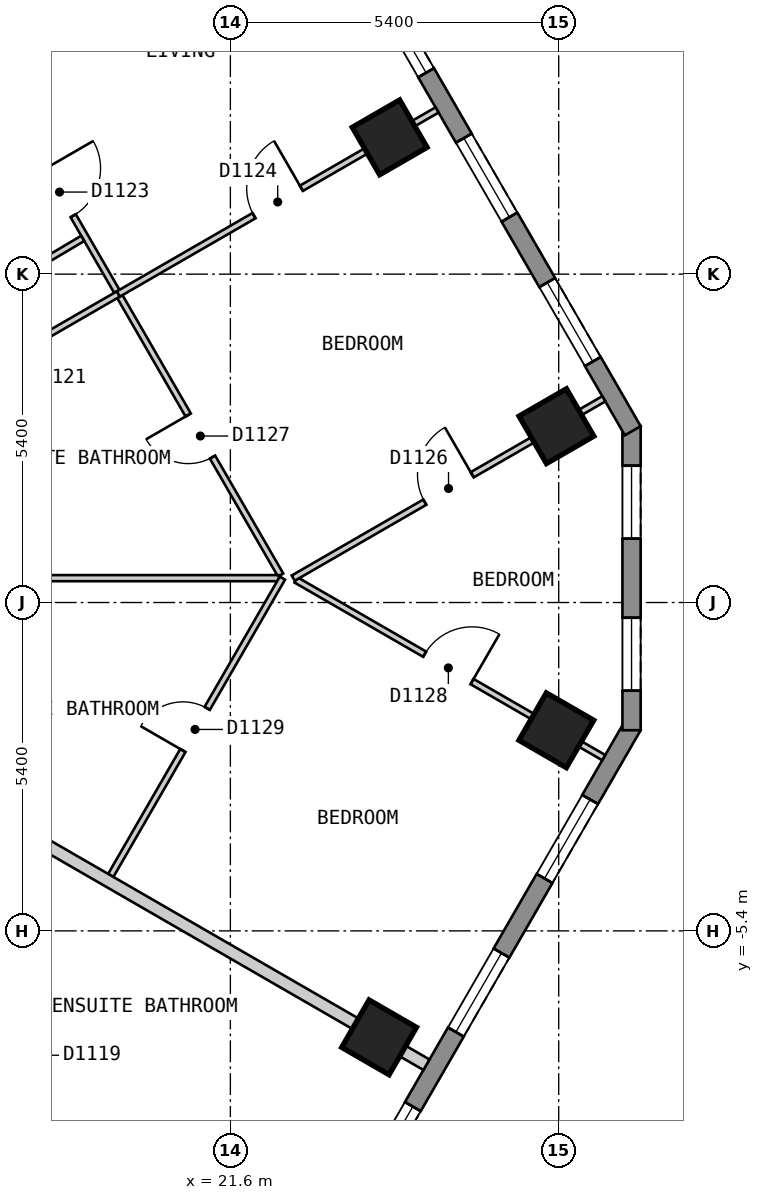
"""IFC4 building model, lengths in metres.
Left out: names, types, materials, properties, quantities, classifications, styles, units other than length and angle.
Written with IfcOpenShell. Run it as: python <this file> out.ifc"""

import sys

from ifc_helpers import new_model, si_unit, direction, frame, frame_2d, origin, origin_2d, place, context, subcontext, project, spatial, polyline, rectangle, outline, extrude, element, fill, save


model = new_model("IFC4")
c1 = context("Model", 3, precision=1e-05, world=origin(), true_north=direction((0.0, 1.0)))
c2 = subcontext(c1, "Body", "Model", "MODEL_VIEW")
j1 = project(units=[si_unit("LENGTHUNIT", "METRE"), si_unit("PLANEANGLEUNIT", "RADIAN")], contexts=[c1])
p1 = place(None, origin())
s1 = spatial("IfcSite", under=j1, at=p1, CompositionType="ELEMENT")
p2 = place(p1, origin())
s2 = spatial("IfcBuilding", under=s1, at=p2, CompositionType="ELEMENT")
p3 = place(p2, frame((0.0, 0.0, 138.6)))
s3 = spatial("IfcBuildingStorey", under=s2, at=p3, CompositionType="ELEMENT", Elevation=138.6)
for number, where, z_axis, x_axis in (
    (1, (24.046, -7.151, 0.0), (0.0, 0.0, 1.0), (0.5, 0.866, 0.0)),
    (2, (26.961, -2.101, 0.0), (0.0, 0.0, 1.0), (0.5, 0.866, 0.0)),
    (3, (26.963, 2.9, 0.0), (0.0, 0.0, 1.0), (-0.5, 0.866, 0.0)),
    (4, (24.22, 7.65, 0.0), (0.0, 0.0, 1.0), (-0.5, 0.866, 0.0)),
):
    element("IfcColumn", number, at=place(p3, frame(where, z_axis=z_axis, x_axis=x_axis)), inside=s3, PredefinedType="COLUMN", context=c2, shape_type="SweptSolid", body=[
        extrude(rectangle(XDim=0.9, YDim=0.9, at=origin_2d()), origin(), (0.0, 0.0, 1.0), 3.0),
    ])
p4 = place(p3, frame((15.862, -23.425, 0.0), z_axis=(0.0, 0.0, 1.0), x_axis=(0.500017503135, 0.866015298109, 0.0)))
e5 = element("IfcWall", 5, at=p4, inside=s3, PredefinedType="SOLIDWALL", context=c2, shape_type="SweptSolid", body=[
    extrude(outline(polyline([(0.0, -0.15), (24.711, -0.15), (24.631, 0.15), (0.08, 0.15), (0.0, -0.15)])), origin(), (0.0, 0.0, 1.0), 2.7),
])
p5 = place(p4, frame((1.4, 0.0, 0.15)))
e6 = element("IfcOpeningElement", 6, at=p5, cuts=e5, PredefinedType="OPENING", context=c2, shape_type="SweptSolid", body=[
    extrude(rectangle(XDim=1.5, YDim=2.1, at=frame_2d((0.75, 1.05))), frame((0.0, 0.16, 0.0), z_axis=(0.0, -1.0, 0.0), x_axis=(1.0, 0.0, 0.0)), (0.0, 0.0, 1.0), 0.32),
])
p6 = place(p4, frame((4.316, 0.0, 0.15)))
e7 = element("IfcOpeningElement", 7, at=p6, cuts=e5, PredefinedType="OPENING", context=c2, shape_type="SweptSolid", body=[
    extrude(rectangle(XDim=1.5, YDim=2.1, at=frame_2d((0.75, 1.05))), frame((0.0, 0.16, 0.0), z_axis=(0.0, -1.0, 0.0), x_axis=(1.0, 0.0, 0.0)), (0.0, 0.0, 1.0), 0.32),
])
p7 = place(p4, frame((7.231, 0.0, 0.15)))
e8 = element("IfcOpeningElement", 8, at=p7, cuts=e5, PredefinedType="OPENING", context=c2, shape_type="SweptSolid", body=[
    extrude(rectangle(XDim=1.5, YDim=2.1, at=frame_2d((0.75, 1.05))), frame((0.0, 0.16, 0.0), z_axis=(0.0, -1.0, 0.0), x_axis=(1.0, 0.0, 0.0)), (0.0, 0.0, 1.0), 0.32),
])
p8 = place(p4, frame((10.147, 0.0, 0.15)))
e9 = element("IfcOpeningElement", 9, at=p8, cuts=e5, PredefinedType="OPENING", context=c2, shape_type="SweptSolid", body=[
    extrude(rectangle(XDim=1.5, YDim=2.1, at=frame_2d((0.75, 1.05))), frame((0.0, 0.16, 0.0), z_axis=(0.0, -1.0, 0.0), x_axis=(1.0, 0.0, 0.0)), (0.0, 0.0, 1.0), 0.32),
])
p9 = place(p4, frame((13.062, 0.0, 0.15)))
e10 = element("IfcOpeningElement", 10, at=p9, cuts=e5, PredefinedType="OPENING", context=c2, shape_type="SweptSolid", body=[
    extrude(rectangle(XDim=1.5, YDim=2.1, at=frame_2d((0.75, 1.05))), frame((0.0, 0.16, 0.0), z_axis=(0.0, -1.0, 0.0), x_axis=(1.0, 0.0, 0.0)), (0.0, 0.0, 1.0), 0.32),
])
p10 = place(p4, frame((15.977, 0.0, 0.15)))
e11 = element("IfcOpeningElement", 11, at=p10, cuts=e5, PredefinedType="OPENING", context=c2, shape_type="SweptSolid", body=[
    extrude(rectangle(XDim=1.5, YDim=2.1, at=frame_2d((0.75, 1.05))), frame((0.0, 0.16, 0.0), z_axis=(0.0, -1.0, 0.0), x_axis=(1.0, 0.0, 0.0)), (0.0, 0.0, 1.0), 0.32),
])
p11 = place(p4, frame((18.893, 0.0, 0.15)))
e12 = element("IfcOpeningElement", 12, at=p11, cuts=e5, PredefinedType="OPENING", context=c2, shape_type="SweptSolid", body=[
    extrude(rectangle(XDim=1.5, YDim=2.1, at=frame_2d((0.75, 1.05))), frame((0.0, 0.16, 0.0), z_axis=(0.0, -1.0, 0.0), x_axis=(1.0, 0.0, 0.0)), (0.0, 0.0, 1.0), 0.32),
])
p12 = place(p4, frame((21.809, 0.0, 0.15)))
e13 = element("IfcOpeningElement", 13, at=p12, cuts=e5, PredefinedType="OPENING", context=c2, shape_type="SweptSolid", body=[
    extrude(rectangle(XDim=1.5, YDim=2.1, at=frame_2d((0.75, 1.05))), frame((0.0, 0.16, 0.0), z_axis=(0.0, -1.0, 0.0), x_axis=(1.0, 0.0, 0.0)), (0.0, 0.0, 1.0), 0.32),
])
p13 = place(p3, frame((28.198, -2.1, 0.0), z_axis=(0.0, 0.0, 1.0), x_axis=(0.0, 1.0, 0.0)))
e14 = element("IfcWall", 14, at=p13, inside=s3, PredefinedType="SOLIDWALL", context=c2, shape_type="SweptSolid", body=[
    extrude(outline(polyline([(0.0, -0.15), (5.0, -0.15), (4.92, 0.15), (0.08, 0.15), (0.0, -0.15)])), origin(), (0.0, 0.0, 1.0), 2.7),
])
p14 = place(p13, frame((0.65, 0.0, 0.15)))
e15 = element("IfcOpeningElement", 15, at=p14, cuts=e14, PredefinedType="OPENING", context=c2, shape_type="SweptSolid", body=[
    extrude(rectangle(XDim=1.2, YDim=2.1, at=frame_2d((0.6, 1.05))), frame((0.0, 0.16, 0.0), z_axis=(0.0, -1.0, 0.0), x_axis=(1.0, 0.0, 0.0)), (0.0, 0.0, 1.0), 0.32),
])
p15 = place(p13, frame((3.15, 0.0, 0.15)))
e16 = element("IfcOpeningElement", 16, at=p15, cuts=e14, PredefinedType="OPENING", context=c2, shape_type="SweptSolid", body=[
    extrude(rectangle(XDim=1.2, YDim=2.1, at=frame_2d((0.6, 1.05))), frame((0.0, 0.16, 0.0), z_axis=(0.0, -1.0, 0.0), x_axis=(1.0, 0.0, 0.0)), (0.0, 0.0, 1.0), 0.32),
])
p16 = place(p3, frame((28.218, 2.825, 0.0), z_axis=(0.0, 0.0, 1.0), x_axis=(-0.500020536353, 0.866013546791, 0.0)))
e17 = element("IfcWall", 17, at=p16, inside=s3, PredefinedType="SOLIDWALL", context=c2, shape_type="SweptSolid", body=[
    extrude(outline(polyline([(0.0, -0.15), (23.325, -0.15), (23.245, 0.15), (0.08, 0.15), (0.0, -0.15)])), origin(), (0.0, 0.0, 1.0), 2.7),
])
p17 = place(p16, frame((1.314, 0.0, 0.15)))
e18 = element("IfcOpeningElement", 18, at=p17, cuts=e17, PredefinedType="OPENING", context=c2, shape_type="SweptSolid", body=[
    extrude(rectangle(XDim=1.5, YDim=2.1, at=frame_2d((0.75, 1.05))), frame((0.0, 0.16, 0.0), z_axis=(0.0, -1.0, 0.0), x_axis=(1.0, 0.0, 0.0)), (0.0, 0.0, 1.0), 0.32),
])
p18 = place(p16, frame((4.056, 0.0, 0.15)))
e19 = element("IfcOpeningElement", 19, at=p18, cuts=e17, PredefinedType="OPENING", context=c2, shape_type="SweptSolid", body=[
    extrude(rectangle(XDim=1.5, YDim=2.1, at=frame_2d((0.75, 1.05))), frame((0.0, 0.16, 0.0), z_axis=(0.0, -1.0, 0.0), x_axis=(1.0, 0.0, 0.0)), (0.0, 0.0, 1.0), 0.32),
])
p19 = place(p16, frame((6.798, 0.0, 0.15)))
e20 = element("IfcOpeningElement", 20, at=p19, cuts=e17, PredefinedType="OPENING", context=c2, shape_type="SweptSolid", body=[
    extrude(rectangle(XDim=1.5, YDim=2.1, at=frame_2d((0.75, 1.05))), frame((0.0, 0.16, 0.0), z_axis=(0.0, -1.0, 0.0), x_axis=(1.0, 0.0, 0.0)), (0.0, 0.0, 1.0), 0.32),
])
p20 = place(p16, frame((9.541, 0.0, 0.15)))
e21 = element("IfcOpeningElement", 21, at=p20, cuts=e17, PredefinedType="OPENING", context=c2, shape_type="SweptSolid", body=[
    extrude(rectangle(XDim=1.5, YDim=2.1, at=frame_2d((0.75, 1.05))), frame((0.0, 0.16, 0.0), z_axis=(0.0, -1.0, 0.0), x_axis=(1.0, 0.0, 0.0)), (0.0, 0.0, 1.0), 0.32),
])
p21 = place(p16, frame((12.284, 0.0, 0.15)))
e22 = element("IfcOpeningElement", 22, at=p21, cuts=e17, PredefinedType="OPENING", context=c2, shape_type="SweptSolid", body=[
    extrude(rectangle(XDim=1.5, YDim=2.1, at=frame_2d((0.75, 1.05))), frame((0.0, 0.16, 0.0), z_axis=(0.0, -1.0, 0.0), x_axis=(1.0, 0.0, 0.0)), (0.0, 0.0, 1.0), 0.32),
])
p22 = place(p16, frame((15.027, 0.0, 0.15)))
e23 = element("IfcOpeningElement", 23, at=p22, cuts=e17, PredefinedType="OPENING", context=c2, shape_type="SweptSolid", body=[
    extrude(rectangle(XDim=1.5, YDim=2.1, at=frame_2d((0.75, 1.05))), frame((0.0, 0.16, 0.0), z_axis=(0.0, -1.0, 0.0), x_axis=(1.0, 0.0, 0.0)), (0.0, 0.0, 1.0), 0.32),
])
p23 = place(p16, frame((17.769, 0.0, 0.15)))
e24 = element("IfcOpeningElement", 24, at=p23, cuts=e17, PredefinedType="OPENING", context=c2, shape_type="SweptSolid", body=[
    extrude(rectangle(XDim=1.5, YDim=2.1, at=frame_2d((0.75, 1.05))), frame((0.0, 0.16, 0.0), z_axis=(0.0, -1.0, 0.0), x_axis=(1.0, 0.0, 0.0)), (0.0, 0.0, 1.0), 0.32),
])
p24 = place(p16, frame((20.511, 0.0, 0.15)))
e25 = element("IfcOpeningElement", 25, at=p24, cuts=e17, PredefinedType="OPENING", context=c2, shape_type="SweptSolid", body=[
    extrude(rectangle(XDim=1.5, YDim=2.1, at=frame_2d((0.75, 1.05))), frame((0.0, 0.16, 0.0), z_axis=(0.0, -1.0, 0.0), x_axis=(1.0, 0.0, 0.0)), (0.0, 0.0, 1.0), 0.32),
])
p25 = place(p3, frame((14.323, 14.487, 0.0), z_axis=(0.0, 0.0, 1.0), x_axis=(0.500011052545, -0.866019022501, 0.0)))
e26 = element("IfcWall", 26, at=p25, inside=s3, PredefinedType="PARTITIONING", context=c2, shape_type="SweptSolid", body=[
    extrude(rectangle(XDim=16.208, YDim=0.1, at=frame_2d((8.104, 0.0))), origin(), (0.0, 0.0, 1.0), 2.7),
])
p26 = place(p25, frame((8.484, 0.0, 0.0)))
e27 = element("IfcOpeningElement", 27, at=p26, cuts=e26, PredefinedType="OPENING", context=c2, shape_type="SweptSolid", body=[
    extrude(rectangle(XDim=0.9, YDim=2.1, at=frame_2d((0.45, 1.05))), frame((0.0, 0.06, 0.0), z_axis=(0.0, -1.0, 0.0), x_axis=(1.0, 0.0, 0.0)), (0.0, 0.0, 1.0), 0.12),
])
p27 = place(p25, frame((2.252, 0.0, 0.0)))
e28 = element("IfcOpeningElement", 28, at=p27, cuts=e26, PredefinedType="OPENING", context=c2, shape_type="SweptSolid", body=[
    extrude(rectangle(XDim=0.8, YDim=2.1, at=frame_2d((0.4, 1.05))), frame((0.0, 0.06, 0.0), z_axis=(0.0, -1.0, 0.0), x_axis=(1.0, 0.0, 0.0)), (0.0, 0.0, 1.0), 0.12),
])
p28 = place(p25, frame((13.167, 0.0, 0.0)))
e29 = element("IfcOpeningElement", 29, at=p28, cuts=e26, PredefinedType="OPENING", context=c2, shape_type="SweptSolid", body=[
    extrude(rectangle(XDim=0.8, YDim=2.1, at=frame_2d((0.4, 1.05))), frame((0.0, 0.06, 0.0), z_axis=(0.0, -1.0, 0.0), x_axis=(1.0, 0.0, 0.0)), (0.0, 0.0, 1.0), 0.12),
])
p29 = place(p3, frame((22.679, 0.372, 0.0), z_axis=(0.0, 0.0, 1.0), x_axis=(0.865985260119, -0.500069524424, 0.0)))
e30 = element("IfcWall", 30, at=p29, inside=s3, PredefinedType="PARTITIONING", context=c2, shape_type="SweptSolid", body=[
    extrude(rectangle(XDim=5.845, YDim=0.1, at=frame_2d((2.923, 0.0))), origin(), (0.0, 0.0, 1.0), 2.7),
])
p30 = place(p29, frame((2.444, 0.0, 0.0)))
e31 = element("IfcOpeningElement", 31, at=p30, cuts=e30, PredefinedType="OPENING", context=c2, shape_type="SweptSolid", body=[
    extrude(rectangle(XDim=0.9, YDim=2.1, at=frame_2d((0.45, 1.05))), frame((0.0, 0.06, 0.0), z_axis=(0.0, -1.0, 0.0), x_axis=(1.0, 0.0, 0.0)), (0.0, 0.0, 1.0), 0.12),
])
p31 = place(p3, frame((17.782, 0.401, 0.0), z_axis=(0.0, 0.0, 1.0), x_axis=(1.0, 0.0, 0.0)))
e32 = element("IfcWall", 32, at=p31, inside=s3, PredefinedType="PARTITIONING", context=c2, shape_type="SweptSolid", body=[
    extrude(rectangle(XDim=4.616, YDim=0.1, at=frame_2d((2.308, 0.0))), origin(), (0.0, 0.0, 1.0), 2.7),
])
p32 = place(p3, frame((19.633, -4.488, 0.0), z_axis=(0.0, 0.0, 1.0), x_axis=(0.500050624552, 0.865996173713, 0.0)))
e33 = element("IfcWall", 33, at=p32, inside=s3, PredefinedType="PARTITIONING", context=c2, shape_type="SweptSolid", body=[
    extrude(rectangle(XDim=5.646, YDim=0.1, at=frame_2d((2.823, 0.0))), origin(), (0.0, 0.0, 1.0), 2.7),
])
p33 = place(p32, frame((2.372, 0.0, 0.0)))
e34 = element("IfcOpeningElement", 34, at=p33, cuts=e33, PredefinedType="OPENING", context=c2, shape_type="SweptSolid", body=[
    extrude(rectangle(XDim=0.8, YDim=2.1, at=frame_2d((0.4, 1.05))), frame((0.0, 0.06, 0.0), z_axis=(0.0, -1.0, 0.0), x_axis=(1.0, 0.0, 0.0)), (0.0, 0.0, 1.0), 0.12),
])
p34 = place(p3, frame((16.339, 3.1, 0.0), z_axis=(0.0, 0.0, 1.0), x_axis=(0.866031112038, 0.499990112884, 0.0)))
e35 = element("IfcWall", 35, at=p34, inside=s3, PredefinedType="PARTITIONING", context=c2, shape_type="SweptSolid", body=[
    extrude(rectangle(XDim=3.948, YDim=0.1, at=frame_2d((1.974, 0.0))), origin(), (0.0, 0.0, 1.0), 2.7),
])
p35 = place(p3, frame((22.634, 0.401, 0.0), z_axis=(0.0, 0.0, 1.0), x_axis=(0.86601325737, 0.500021037617, 0.0)))
e36 = element("IfcWall", 36, at=p35, inside=s3, PredefinedType="PARTITIONING", context=c2, shape_type="SweptSolid", body=[
    extrude(rectangle(XDim=5.898, YDim=0.1, at=frame_2d((2.949, 0.0))), origin(), (0.0, 0.0, 1.0), 2.7),
])
p36 = place(p35, frame((2.499, 0.0, 0.0)))
e37 = element("IfcOpeningElement", 37, at=p36, cuts=e36, PredefinedType="OPENING", context=c2, shape_type="SweptSolid", body=[
    extrude(rectangle(XDim=0.9, YDim=2.1, at=frame_2d((0.45, 1.05))), frame((0.0, 0.06, 0.0), z_axis=(0.0, -1.0, 0.0), x_axis=(1.0, 0.0, 0.0)), (0.0, 0.0, 1.0), 0.12),
])
p37 = place(p3, frame((15.818, 4.002, 0.0), z_axis=(0.0, 0.0, 1.0), x_axis=(0.860457323494, 0.509522516132, 0.0)))
e38 = element("IfcWall", 38, at=p37, inside=s3, PredefinedType="PARTITIONING", context=c2, shape_type="SweptSolid", body=[
    extrude(rectangle(XDim=3.898, YDim=0.1, at=frame_2d((1.949, 0.0))), origin(), (0.0, 0.0, 1.0), 2.7),
])
p38 = place(p37, frame((1.524, 0.0, 0.0)))
e39 = element("IfcOpeningElement", 39, at=p38, cuts=e38, PredefinedType="OPENING", context=c2, shape_type="SweptSolid", body=[
    extrude(rectangle(XDim=0.8, YDim=2.1, at=frame_2d((0.4, 1.05))), frame((0.0, 0.06, 0.0), z_axis=(0.0, -1.0, 0.0), x_axis=(1.0, 0.0, 0.0)), (0.0, 0.0, 1.0), 0.12),
])
p39 = place(p3, frame((16.165, -2.601, 0.0), z_axis=(0.0, 0.0, 1.0), x_axis=(0.866016855193, -0.500014806302, 0.0)))
e40 = element("IfcWall", 40, at=p39, inside=s3, PredefinedType="PARTITIONING", context=c2, shape_type="SweptSolid", body=[
    extrude(rectangle(XDim=10.0, YDim=0.2, at=frame_2d((5.0, 0.0))), origin(), (0.0, 0.0, 1.0), 2.7),
])
p40 = place(p3, frame((19.758, 5.074, 0.0), z_axis=(0.0, 0.0, 1.0), x_axis=(0.866007554612, 0.500030914399, 0.0)))
e41 = element("IfcWall", 41, at=p40, inside=s3, PredefinedType="PARTITIONING", context=c2, shape_type="SweptSolid", body=[
    extrude(rectangle(XDim=6.052, YDim=0.1, at=frame_2d((3.026, 0.0))), origin(), (0.0, 0.0, 1.0), 2.7),
])
p41 = place(p40, frame((2.576, 0.0, 0.0)))
e42 = element("IfcOpeningElement", 42, at=p41, cuts=e41, PredefinedType="OPENING", context=c2, shape_type="SweptSolid", body=[
    extrude(rectangle(XDim=0.9, YDim=2.1, at=frame_2d((0.45, 1.05))), frame((0.0, 0.06, 0.0), z_axis=(0.0, -1.0, 0.0), x_axis=(1.0, 0.0, 0.0)), (0.0, 0.0, 1.0), 0.12),
])
p42 = place(p10, origin())
e43 = element("IfcWindow", 43, at=p42, inside=s3, PartitioningType="SINGLE_PANEL", PredefinedType="WINDOW", context=c2, shape_type="SweptSolid", body=[
    extrude(rectangle(XDim=1.5, YDim=2.1, at=frame_2d((0.75, 1.05))), frame((0.0, 0.03, 0.0), z_axis=(0.0, -1.0, 0.0), x_axis=(1.0, 0.0, 0.0)), (0.0, 0.0, 1.0), 0.06),
])
fill(e11, e43)
p43 = place(p11, origin())
e44 = element("IfcWindow", 44, at=p43, inside=s3, PartitioningType="SINGLE_PANEL", PredefinedType="WINDOW", context=c2, shape_type="SweptSolid", body=[
    extrude(rectangle(XDim=1.5, YDim=2.1, at=frame_2d((0.75, 1.05))), frame((0.0, 0.03, 0.0), z_axis=(0.0, -1.0, 0.0), x_axis=(1.0, 0.0, 0.0)), (0.0, 0.0, 1.0), 0.06),
])
fill(e12, e44)
p44 = place(p12, origin())
e45 = element("IfcWindow", 45, at=p44, inside=s3, PartitioningType="SINGLE_PANEL", PredefinedType="WINDOW", context=c2, shape_type="SweptSolid", body=[
    extrude(rectangle(XDim=1.5, YDim=2.1, at=frame_2d((0.75, 1.05))), frame((0.0, 0.03, 0.0), z_axis=(0.0, -1.0, 0.0), x_axis=(1.0, 0.0, 0.0)), (0.0, 0.0, 1.0), 0.06),
])
fill(e13, e45)
p45 = place(p14, origin())
e46 = element("IfcWindow", 46, at=p45, inside=s3, PartitioningType="SINGLE_PANEL", PredefinedType="WINDOW", context=c2, shape_type="SweptSolid", body=[
    extrude(rectangle(XDim=1.2, YDim=2.1, at=frame_2d((0.6, 1.05))), frame((0.0, 0.03, 0.0), z_axis=(0.0, -1.0, 0.0), x_axis=(1.0, 0.0, 0.0)), (0.0, 0.0, 1.0), 0.06),
])
fill(e15, e46)
p46 = place(p15, origin())
e47 = element("IfcWindow", 47, at=p46, inside=s3, PartitioningType="SINGLE_PANEL", PredefinedType="WINDOW", context=c2, shape_type="SweptSolid", body=[
    extrude(rectangle(XDim=1.2, YDim=2.1, at=frame_2d((0.6, 1.05))), frame((0.0, 0.03, 0.0), z_axis=(0.0, -1.0, 0.0), x_axis=(1.0, 0.0, 0.0)), (0.0, 0.0, 1.0), 0.06),
])
fill(e16, e47)
p47 = place(p17, origin())
e48 = element("IfcWindow", 48, at=p47, inside=s3, PartitioningType="SINGLE_PANEL", PredefinedType="WINDOW", context=c2, shape_type="SweptSolid", body=[
    extrude(rectangle(XDim=1.5, YDim=2.1, at=frame_2d((0.75, 1.05))), frame((0.0, 0.03, 0.0), z_axis=(0.0, -1.0, 0.0), x_axis=(1.0, 0.0, 0.0)), (0.0, 0.0, 1.0), 0.06),
])
fill(e18, e48)
p48 = place(p18, origin())
e49 = element("IfcWindow", 49, at=p48, inside=s3, PartitioningType="SINGLE_PANEL", PredefinedType="WINDOW", context=c2, shape_type="SweptSolid", body=[
    extrude(rectangle(XDim=1.5, YDim=2.1, at=frame_2d((0.75, 1.05))), frame((0.0, 0.03, 0.0), z_axis=(0.0, -1.0, 0.0), x_axis=(1.0, 0.0, 0.0)), (0.0, 0.0, 1.0), 0.06),
])
fill(e19, e49)
p49 = place(p19, origin())
e50 = element("IfcWindow", 50, at=p49, inside=s3, PartitioningType="SINGLE_PANEL", PredefinedType="WINDOW", context=c2, shape_type="SweptSolid", body=[
    extrude(rectangle(XDim=1.5, YDim=2.1, at=frame_2d((0.75, 1.05))), frame((0.0, 0.03, 0.0), z_axis=(0.0, -1.0, 0.0), x_axis=(1.0, 0.0, 0.0)), (0.0, 0.0, 1.0), 0.06),
])
fill(e20, e50)
p50 = place(p26, origin())
e51 = element("IfcDoor", 51, at=p50, inside=s3, OperationType="SINGLE_SWING_LEFT", PredefinedType="DOOR", context=c2, shape_type="SweptSolid", body=[
    extrude(rectangle(XDim=0.9, YDim=2.1, at=frame_2d((0.45, 1.05))), frame((0.0, 0.025, 0.0), z_axis=(0.0, -1.0, 0.0), x_axis=(1.0, 0.0, 0.0)), (0.0, 0.0, 1.0), 0.05),
])
fill(e27, e51)
p51 = place(p41, origin())
e52 = element("IfcDoor", 52, at=p51, inside=s3, OperationType="SINGLE_SWING_RIGHT", PredefinedType="DOOR", context=c2, shape_type="SweptSolid", body=[
    extrude(rectangle(XDim=0.9, YDim=2.1, at=frame_2d((0.45, 1.05))), frame((0.0, 0.025, 0.0), z_axis=(0.0, -1.0, 0.0), x_axis=(1.0, 0.0, 0.0)), (0.0, 0.0, 1.0), 0.05),
])
fill(e42, e52)
p52 = place(p36, origin())
e53 = element("IfcDoor", 53, at=p52, inside=s3, OperationType="SINGLE_SWING_RIGHT", PredefinedType="DOOR", context=c2, shape_type="SweptSolid", body=[
    extrude(rectangle(XDim=0.9, YDim=2.1, at=frame_2d((0.45, 1.05))), frame((0.0, 0.025, 0.0), z_axis=(0.0, -1.0, 0.0), x_axis=(1.0, 0.0, 0.0)), (0.0, 0.0, 1.0), 0.05),
])
fill(e37, e53)
p53 = place(p28, origin())
e54 = element("IfcDoor", 54, at=p53, inside=s3, OperationType="SINGLE_SWING_LEFT", PredefinedType="DOOR", context=c2, shape_type="SweptSolid", body=[
    extrude(rectangle(XDim=0.8, YDim=2.1, at=frame_2d((0.4, 1.05))), frame((0.0, 0.025, 0.0), z_axis=(0.0, -1.0, 0.0), x_axis=(1.0, 0.0, 0.0)), (0.0, 0.0, 1.0), 0.05),
])
fill(e29, e54)
p54 = place(p30, origin())
e55 = element("IfcDoor", 55, at=p54, inside=s3, OperationType="SINGLE_SWING_RIGHT", PredefinedType="DOOR", context=c2, shape_type="SweptSolid", body=[
    extrude(rectangle(XDim=0.9, YDim=2.1, at=frame_2d((0.45, 1.05))), frame((0.0, 0.025, 0.0), z_axis=(0.0, -1.0, 0.0), x_axis=(1.0, 0.0, 0.0)), (0.0, 0.0, 1.0), 0.05),
])
fill(e31, e55)
p55 = place(p33, origin())
e56 = element("IfcDoor", 56, at=p55, inside=s3, OperationType="SINGLE_SWING_LEFT", PredefinedType="DOOR", context=c2, shape_type="SweptSolid", body=[
    extrude(rectangle(XDim=0.8, YDim=2.1, at=frame_2d((0.4, 1.05))), frame((0.0, 0.025, 0.0), z_axis=(0.0, -1.0, 0.0), x_axis=(1.0, 0.0, 0.0)), (0.0, 0.0, 1.0), 0.05),
])
fill(e34, e56)
save(model, sys.argv[1])
